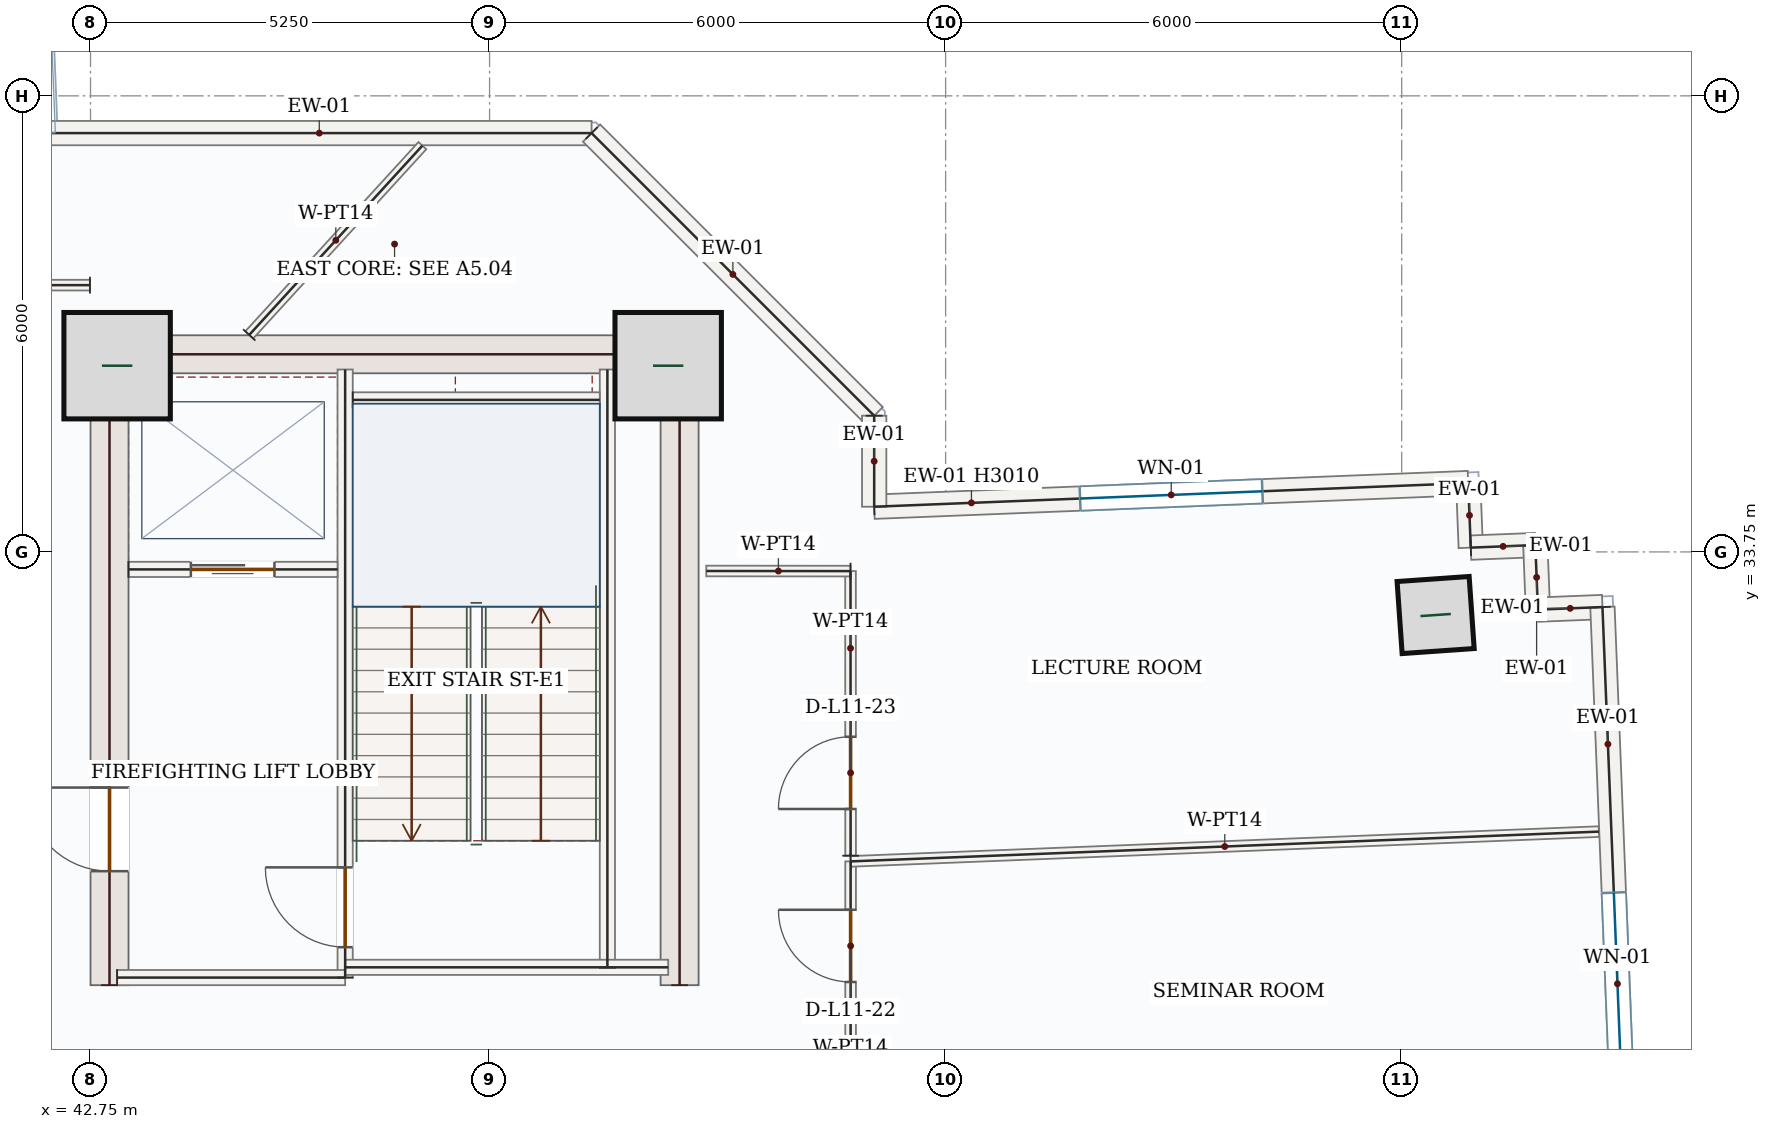
"""IFC4 building model, lengths in metres.
Left out: names, types, materials, properties, quantities, classifications, styles, units other than length and angle.
Written with IfcOpenShell. Run it as: python <this file> out.ifc"""

import sys

from ifc_helpers import new_model, si_unit, direction, frame, frame_2d, origin, origin_2d, place, context, subcontext, project, spatial, rectangle, hollow_rectangle, extrude, source, transform, mapped, element, fill, save


model = new_model("IFC4")
c1 = context("Model", 3, precision=1e-05, world=origin(), true_north=direction((0.0, 1.0)))
c2 = subcontext(c1, "Body", "Model", "MODEL_VIEW")
j1 = project(units=[si_unit("LENGTHUNIT", "METRE"), si_unit("PLANEANGLEUNIT", "RADIAN")], contexts=[c1])
p1 = place(None, origin())
s1 = spatial("IfcSite", under=j1, at=p1, CompositionType="ELEMENT")
p2 = place(p1, origin())
s2 = spatial("IfcBuilding", under=s1, at=p2, CompositionType="ELEMENT")
p3 = place(p2, frame((0.0, 0.0, 54.3)))
s3 = spatial("IfcBuildingStorey", under=s2, at=p3, CompositionType="ELEMENT", Elevation=54.3)
p4 = place(p3, frame((43.0, 28.05, 0.0), z_axis=(0.0, 0.0, 1.0), x_axis=(0.0, 1.0, 0.0)))
e1 = element("IfcWall", 1, at=p4, inside=s3, PredefinedType="SHEAR", context=c2, shape_type="SweptSolid", body=[
    extrude(rectangle(XDim=8.55, YDim=0.5, at=frame_2d((4.275, 0.0))), origin(), (0.0, 0.0, 1.0), 3.95),
])
p5 = place(p4, frame((1.5, 0.0, 0.0)))
e2 = element("IfcOpeningElement", 2, at=p5, cuts=e1, PredefinedType="OPENING", context=c2, shape_type="SweptSolid", body=[
    extrude(rectangle(XDim=1.1, YDim=2.2, at=frame_2d((0.55, 1.1))), frame((0.0, 0.26, 0.0), z_axis=(0.0, -1.0, 0.0), x_axis=(1.0, 0.0, 0.0)), (0.0, 0.0, 1.0), 0.52),
])
m1 = source(origin(), c2, "Body", "SweptSolid", [
    extrude(rectangle(XDim=8.55, YDim=0.5, at=frame_2d((4.275, 0.0))), origin(), (0.0, 0.0, 1.0), 3.95),
])
p6 = place(p3, frame((50.5, 28.05, 0.0), z_axis=(0.0, 0.0, 1.0), x_axis=(0.0, 1.0, 0.0)))
e3 = element("IfcWall", 3, at=p6, inside=s3, PredefinedType="SHEAR", context=c2, shape_type="MappedRepresentation", body=[
    mapped(m1, transform((0.0, 0.0, 0.0), x_axis=(1.0, 0.0, 0.0), y_axis=(0.0, 1.0, 0.0), z_axis=(0.0, 0.0, 1.0), scale=1.0)),
])
m2 = source(origin(), c2, "Body", "SweptSolid", [
    extrude(rectangle(XDim=7.0, YDim=0.5, at=frame_2d((3.5, 0.0))), origin(), (0.0, 0.0, 1.0), 3.95),
])
p7 = place(p3, frame((43.25, 36.35, 0.0), z_axis=(0.0, 0.0, 1.0), x_axis=(1.0, 0.0, 0.0)))
e4 = element("IfcWall", 4, at=p7, inside=s3, PredefinedType="SHEAR", context=c2, shape_type="MappedRepresentation", body=[
    mapped(m2, transform((0.0, 0.0, 0.0), x_axis=(1.0, 0.0, 0.0), y_axis=(0.0, 1.0, 0.0), z_axis=(0.0, 0.0, 1.0), scale=1.0)),
])
m3 = source(origin(), c2, "Body", "SweptSolid", [
    extrude(rectangle(XDim=1.4, YDim=1.4, at=origin_2d()), origin(), (0.0, 0.0, 1.0), 4.2),
])
for number, where, z_axis, x_axis in (
    (5, (43.1, 36.2, 0.0), (0.0, 0.0, 1.0), (1.0, 0.0, 0.0)),
    (6, (50.35, 36.2, 0.0), (0.0, 0.0, 1.0), (1.0, 0.0, 0.0)),
):
    element("IfcColumn", number, at=place(p3, frame(where, z_axis=z_axis, x_axis=x_axis)), inside=s3, PredefinedType="COLUMN", context=c2, shape_type="MappedRepresentation", body=[
        mapped(m3, transform((0.0, 0.0, 0.0), x_axis=(1.0, 0.0, 0.0), y_axis=(0.0, 1.0, 0.0), z_axis=(0.0, 0.0, 1.0), scale=1.0)),
    ])
m4 = source(origin(), c2, "Body", "SweptSolid", [
    extrude(hollow_rectangle(XDim=0.95, YDim=0.95, WallThickness=0.05, at=origin_2d()), origin(), (0.0, 0.0, 1.0), 4.2),
])
p8 = place(p3, frame((60.447, 32.92, 0.0), z_axis=(0.0, 0.0, 1.0), x_axis=(0.99756405026, 0.069756473744, 0.0)))
e7 = element("IfcColumn", 7, at=p8, inside=s3, PredefinedType="COLUMN", context=c2, shape_type="MappedRepresentation", body=[
    mapped(m4, transform((0.0, 0.0, 0.0), x_axis=(1.0, 0.0, 0.0), y_axis=(0.0, 1.0, 0.0), z_axis=(0.0, 0.0, 1.0), scale=1.0)),
])
p9 = place(p3, frame((53.06, 34.344, 0.0), z_axis=(0.0, 0.0, 1.0), x_axis=(0.999208917222, 0.039768577336, 0.0)))
e8 = element("IfcWall", 8, at=p9, inside=s3, PredefinedType="SOLIDWALL", context=c2, shape_type="SweptSolid", body=[
    extrude(rectangle(XDim=7.821, YDim=0.32, at=frame_2d((3.911, 0.0))), origin(), (0.0, 0.0, 1.0), 3.01),
])
p10 = place(p9, frame((2.711, 0.0, 0.85)))
e9 = element("IfcOpeningElement", 9, at=p10, cuts=e8, PredefinedType="OPENING", context=c2, shape_type="SweptSolid", body=[
    extrude(rectangle(XDim=2.4, YDim=1.8, at=frame_2d((1.2, 0.9))), frame((0.0, 0.17, 0.0), z_axis=(0.0, -1.0, 0.0), x_axis=(1.0, 0.0, 0.0)), (0.0, 0.0, 1.0), 0.34),
])
m5 = source(origin(), c2, "Body", "SweptSolid", [
    extrude(rectangle(XDim=0.85, YDim=0.32, at=frame_2d((0.425, 0.0))), origin(), (0.0, 0.0, 1.0), 3.95),
])
p11 = place(p3, frame((60.875, 34.656, 0.0), z_axis=(0.0, 0.0, 1.0), x_axis=(0.039933618331, -0.999202334929, 0.0)))
e10 = element("IfcWall", 10, at=p11, inside=s3, PredefinedType="SOLIDWALL", context=c2, shape_type="MappedRepresentation", body=[
    mapped(m5, transform((0.0, 0.0, 0.0), x_axis=(1.0, 0.0, 0.0), y_axis=(0.0, 1.0, 0.0), z_axis=(0.0, 0.0, 1.0), scale=1.0)),
])
m6 = source(origin(), c2, "Body", "SweptSolid", [
    extrude(rectangle(XDim=0.85, YDim=0.32, at=frame_2d((0.425, 0.0))), origin(), (0.0, 0.0, 1.0), 3.95),
])
for number, where, z_axis, x_axis in (
    (11, (60.909, 33.806, 0.0), (0.0, 0.0, 1.0), (0.999, 0.04, 0.0)),
    (12, (61.758, 33.84, 0.0), (0.0, 0.0, 1.0), (0.04, -0.999, 0.0)),
    (13, (61.792, 32.991, 0.0), (0.0, 0.0, 1.0), (0.999, 0.04, 0.0)),
):
    element("IfcWall", number, at=place(p3, frame(where, z_axis=z_axis, x_axis=x_axis)), inside=s3, PredefinedType="SOLIDWALL", context=c2, shape_type="MappedRepresentation", body=[
        mapped(m6, transform((0.0, 0.0, 0.0), x_axis=(1.0, 0.0, 0.0), y_axis=(0.0, 1.0, 0.0), z_axis=(0.0, 0.0, 1.0), scale=1.0)),
    ])
p12 = place(p3, frame((62.641, 33.025, 0.0), z_axis=(0.0, 0.0, 1.0), x_axis=(0.03977146366, -0.999208802342, 0.0)))
e14 = element("IfcWall", 14, at=p12, inside=s3, PredefinedType="SOLIDWALL", context=c2, shape_type="SweptSolid", body=[
    extrude(rectangle(XDim=9.92, YDim=0.32, at=frame_2d((4.96, 0.0))), origin(), (0.0, 0.0, 1.0), 3.95),
])
p13 = place(p12, frame((3.76, 0.0, 0.85)))
e15 = element("IfcOpeningElement", 15, at=p13, cuts=e14, PredefinedType="OPENING", context=c2, shape_type="SweptSolid", body=[
    extrude(rectangle(XDim=2.4, YDim=1.8, at=frame_2d((1.2, 0.9))), frame((0.0, 0.17, 0.0), z_axis=(0.0, -1.0, 0.0), x_axis=(1.0, 0.0, 0.0)), (0.0, 0.0, 1.0), 0.34),
])
m7 = source(origin(), c2, "Body", "SweptSolid", [
    extrude(rectangle(XDim=7.165, YDim=0.32, at=frame_2d((3.583, 0.0))), origin(), (0.0, 0.0, 1.0), 3.95),
])
p14 = place(p3, frame((42.177, 39.26, 0.0), z_axis=(0.0, 0.0, 1.0), x_axis=(1.0, 0.0, 0.0)))
e16 = element("IfcWall", 16, at=p14, inside=s3, PredefinedType="SOLIDWALL", context=c2, shape_type="MappedRepresentation", body=[
    mapped(m7, transform((0.0, 0.0, 0.0), x_axis=(1.0, 0.0, 0.0), y_axis=(0.0, 1.0, 0.0), z_axis=(0.0, 0.0, 1.0), scale=1.0)),
])
m8 = source(origin(), c2, "Body", "SweptSolid", [
    extrude(rectangle(XDim=5.258, YDim=0.32, at=frame_2d((2.629, 0.0))), origin(), (0.0, 0.0, 1.0), 3.95),
])
p15 = place(p3, frame((49.342, 39.26, 0.0), z_axis=(0.0, 0.0, 1.0), x_axis=(0.707106781187, -0.707106781187, 0.0)))
e17 = element("IfcWall", 17, at=p15, inside=s3, PredefinedType="SOLIDWALL", context=c2, shape_type="MappedRepresentation", body=[
    mapped(m8, transform((0.0, 0.0, 0.0), x_axis=(1.0, 0.0, 0.0), y_axis=(0.0, 1.0, 0.0), z_axis=(0.0, 0.0, 1.0), scale=1.0)),
])
m9 = source(origin(), c2, "Body", "SweptSolid", [
    extrude(rectangle(XDim=1.198, YDim=0.32, at=frame_2d((0.599, 0.0))), origin(), (0.0, 0.0, 1.0), 3.95),
])
p16 = place(p3, frame((53.06, 35.542, 0.0), z_axis=(0.0, 0.0, 1.0), x_axis=(0.0, -1.0, 0.0)))
e18 = element("IfcWall", 18, at=p16, inside=s3, PredefinedType="SOLIDWALL", context=c2, shape_type="MappedRepresentation", body=[
    mapped(m9, transform((0.0, 0.0, 0.0), x_axis=(1.0, 0.0, 0.0), y_axis=(0.0, 1.0, 0.0), z_axis=(0.0, 0.0, 1.0), scale=1.0)),
])
m10 = source(origin(), c2, "Body", "SweptSolid", [
    extrude(rectangle(XDim=7.87, YDim=0.2, at=frame_2d((3.935, 0.0))), origin(), (0.0, 0.0, 1.0), 3.95),
])
p17 = place(p3, frame((49.55, 28.28, 0.0), z_axis=(0.0, 0.0, 1.0), x_axis=(0.0, 1.0, 0.0)))
e19 = element("IfcWall", 19, at=p17, inside=s3, PredefinedType="SOLIDWALL", context=c2, shape_type="MappedRepresentation", body=[
    mapped(m10, transform((0.0, 0.0, 0.0), x_axis=(1.0, 0.0, 0.0), y_axis=(0.0, 1.0, 0.0), z_axis=(0.0, 0.0, 1.0), scale=1.0)),
])
p18 = place(p3, frame((46.1, 28.15, 0.0), z_axis=(0.0, 0.0, 1.0), x_axis=(0.0, 1.0, 0.0)))
e20 = element("IfcWall", 20, at=p18, inside=s3, PredefinedType="SOLIDWALL", context=c2, shape_type="SweptSolid", body=[
    extrude(rectangle(XDim=8.0, YDim=0.2, at=frame_2d((4.0, 0.0))), origin(), (0.0, 0.0, 1.0), 3.95),
])
p19 = place(p18, frame((0.4, 0.0, 0.0)))
e21 = element("IfcOpeningElement", 21, at=p19, cuts=e20, PredefinedType="OPENING", context=c2, shape_type="SweptSolid", body=[
    extrude(rectangle(XDim=1.05, YDim=2.15, at=frame_2d((0.525, 1.075))), frame((0.0, 0.11, 0.0), z_axis=(0.0, -1.0, 0.0), x_axis=(1.0, 0.0, 0.0)), (0.0, 0.0, 1.0), 0.22),
])
m11 = source(origin(), c2, "Body", "SweptSolid", [
    extrude(rectangle(XDim=3.0, YDim=0.2, at=frame_2d((1.5, 0.0))), origin(), (0.0, 0.0, 1.0), 3.95),
])
p20 = place(p3, frame((43.1, 28.15, 0.0), z_axis=(0.0, 0.0, 1.0), x_axis=(1.0, 0.0, 0.0)))
e22 = element("IfcWall", 22, at=p20, inside=s3, PredefinedType="SOLIDWALL", context=c2, shape_type="MappedRepresentation", body=[
    mapped(m11, transform((0.0, 0.0, 0.0), x_axis=(1.0, 0.0, 0.0), y_axis=(0.0, 1.0, 0.0), z_axis=(0.0, 0.0, 1.0), scale=1.0)),
])
m12 = source(origin(), c2, "Body", "SweptSolid", [
    extrude(rectangle(XDim=4.25, YDim=0.2, at=frame_2d((2.125, 0.0))), origin(), (0.0, 0.0, 1.0), 3.95),
])
p21 = place(p3, frame((46.1, 28.285, 0.0), z_axis=(0.0, 0.0, 1.0), x_axis=(1.0, 0.0, 0.0)))
e23 = element("IfcWall", 23, at=p21, inside=s3, PredefinedType="SOLIDWALL", context=c2, shape_type="MappedRepresentation", body=[
    mapped(m12, transform((0.0, 0.0, 0.0), x_axis=(1.0, 0.0, 0.0), y_axis=(0.0, 1.0, 0.0), z_axis=(0.0, 0.0, 1.0), scale=1.0)),
])
m13 = source(origin(), c2, "Body", "SweptSolid", [
    extrude(rectangle(XDim=3.25, YDim=0.2, at=frame_2d((1.625, 0.0))), origin(), (0.0, 0.0, 1.0), 3.95),
])
p22 = place(p3, frame((46.2, 35.75, 0.0), z_axis=(0.0, 0.0, 1.0), x_axis=(1.0, 0.0, 0.0)))
e24 = element("IfcWall", 24, at=p22, inside=s3, PredefinedType="SOLIDWALL", context=c2, shape_type="MappedRepresentation", body=[
    mapped(m13, transform((0.0, 0.0, 0.0), x_axis=(1.0, 0.0, 0.0), y_axis=(0.0, 1.0, 0.0), z_axis=(0.0, 0.0, 1.0), scale=1.0)),
])
p23 = place(p3, frame((43.25, 33.52, 0.0), z_axis=(0.0, 0.0, 1.0), x_axis=(1.0, 0.0, 0.0)))
e25 = element("IfcWall", 25, at=p23, inside=s3, PredefinedType="SOLIDWALL", context=c2, shape_type="SweptSolid", body=[
    extrude(rectangle(XDim=2.75, YDim=0.2, at=frame_2d((1.375, 0.0))), origin(), (0.0, 0.0, 1.0), 3.95),
])
p24 = place(p23, frame((0.82, 0.0, 0.0)))
e26 = element("IfcOpeningElement", 26, at=p24, cuts=e25, PredefinedType="OPENING", context=c2, shape_type="SweptSolid", body=[
    extrude(rectangle(XDim=1.1, YDim=2.15, at=frame_2d((0.55, 1.075))), frame((0.0, 0.11, 0.0), z_axis=(0.0, -1.0, 0.0), x_axis=(1.0, 0.0, 0.0)), (0.0, 0.0, 1.0), 0.22),
])
p25 = place(p3, frame((52.75, 25.835, 0.0), z_axis=(0.0, 0.0, 1.0), x_axis=(0.0, 1.0, 0.0)))
e27 = element("IfcWall", 27, at=p25, inside=s3, PredefinedType="PARTITIONING", context=c2, shape_type="SweptSolid", body=[
    extrude(rectangle(XDim=3.843, YDim=0.14, at=frame_2d((1.921, 0.0))), origin(), (0.0, 0.0, 1.0), 3.95),
])
p26 = place(p25, frame((2.257, 0.0, 0.0)))
e28 = element("IfcOpeningElement", 28, at=p26, cuts=e27, PredefinedType="OPENING", context=c2, shape_type="SweptSolid", body=[
    extrude(rectangle(XDim=0.95, YDim=2.15, at=frame_2d((0.475, 1.075))), frame((0.0, 0.08, 0.0), z_axis=(0.0, -1.0, 0.0), x_axis=(1.0, 0.0, 0.0)), (0.0, 0.0, 1.0), 0.16),
])
m14 = source(origin(), c2, "Body", "SweptSolid", [
    extrude(rectangle(XDim=9.851, YDim=0.14, at=frame_2d((4.925, 0.0))), origin(), (0.0, 0.0, 1.0), 3.95),
])
p27 = place(p3, frame((52.751, 29.678, 0.0), z_axis=(0.0, 0.0, 1.0), x_axis=(0.999208542072, 0.039778002084, 0.0)))
e29 = element("IfcWall", 29, at=p27, inside=s3, PredefinedType="PARTITIONING", context=c2, shape_type="MappedRepresentation", body=[
    mapped(m14, transform((0.0, 0.0, 0.0), x_axis=(1.0, 0.0, 0.0), y_axis=(0.0, 1.0, 0.0), z_axis=(0.0, 0.0, 1.0), scale=1.0)),
])
m15 = source(origin(), c2, "Body", "SweptSolid", [
    extrude(rectangle(XDim=3.375, YDim=0.14, at=frame_2d((1.688, 0.0))), origin(), (0.0, 0.0, 1.0), 3.95),
])
p28 = place(p3, frame((44.838, 36.605, 0.0), z_axis=(0.0, 0.0, 1.0), x_axis=(0.674974079893, 0.737841440604, 0.0)))
e30 = element("IfcWall", 30, at=p28, inside=s3, PredefinedType="PARTITIONING", context=c2, shape_type="MappedRepresentation", body=[
    mapped(m15, transform((0.0, 0.0, 0.0), x_axis=(1.0, 0.0, 0.0), y_axis=(0.0, 1.0, 0.0), z_axis=(0.0, 0.0, 1.0), scale=1.0)),
])
p29 = place(p3, frame((52.75, 29.753, 0.0), z_axis=(0.0, 0.0, 1.0), x_axis=(-0.000326030238, 0.999999946852, 0.0)))
e31 = element("IfcWall", 31, at=p29, inside=s3, PredefinedType="PARTITIONING", context=c2, shape_type="SweptSolid", body=[
    extrude(rectangle(XDim=3.744, YDim=0.14, at=frame_2d((1.872, 0.0))), origin(), (0.0, 0.0, 1.0), 3.95),
])
p30 = place(p29, frame((0.615, 0.0, 0.0)))
e32 = element("IfcOpeningElement", 32, at=p30, cuts=e31, PredefinedType="OPENING", context=c2, shape_type="SweptSolid", body=[
    extrude(rectangle(XDim=0.95, YDim=2.15, at=frame_2d((0.475, 1.075))), frame((0.0, 0.08, 0.0), z_axis=(0.0, -1.0, 0.0), x_axis=(1.0, 0.0, 0.0)), (0.0, 0.0, 1.0), 0.16),
])
m16 = source(origin(), c2, "Body", "SweptSolid", [
    extrude(rectangle(XDim=1.898, YDim=0.14, at=frame_2d((0.949, 0.0))), origin(), (0.0, 0.0, 1.0), 3.95),
])
p31 = place(p3, frame((52.749, 33.498, 0.0), z_axis=(0.0, 0.0, 1.0), x_axis=(-0.999999702083, 0.00077190251, 0.0)))
e33 = element("IfcWall", 33, at=p31, inside=s3, PredefinedType="PARTITIONING", context=c2, shape_type="MappedRepresentation", body=[
    mapped(m16, transform((0.0, 0.0, 0.0), x_axis=(1.0, 0.0, 0.0), y_axis=(0.0, 1.0, 0.0), z_axis=(0.0, 0.0, 1.0), scale=1.0)),
])
p32 = place(p3, frame((42.742, 37.26, 0.0), z_axis=(0.0, 0.0, 1.0), x_axis=(-0.999999998277, 5.8706117e-05, 0.0)))
e34 = element("IfcWall", 34, at=p32, inside=s3, PredefinedType="PARTITIONING", context=c2, shape_type="SweptSolid", body=[
    extrude(rectangle(XDim=4.159, YDim=0.14, at=frame_2d((2.079, 0.0))), origin(), (0.0, 0.0, 1.0), 3.95),
])
p33 = place(p32, frame((2.503, 0.0, 0.0)))
e35 = element("IfcOpeningElement", 35, at=p33, cuts=e34, PredefinedType="OPENING", context=c2, shape_type="SweptSolid", body=[
    extrude(rectangle(XDim=0.95, YDim=2.15, at=frame_2d((0.475, 1.075))), frame((0.0, 0.08, 0.0), z_axis=(0.0, -1.0, 0.0), x_axis=(1.0, 0.0, 0.0)), (0.0, 0.0, 1.0), 0.16),
])
m17 = source(origin(), c2, "Body", "SweptSolid", [
    extrude(rectangle(XDim=2.4, YDim=1.8, at=frame_2d((1.2, 0.9))), frame((0.0, 0.03, 0.0), z_axis=(0.0, -1.0, 0.0), x_axis=(1.0, 0.0, 0.0)), (0.0, 0.0, 1.0), 0.06),
])
p34 = place(p10, origin())
e36 = element("IfcWindow", 36, at=p34, inside=s3, PartitioningType="DOUBLE_PANEL_VERTICAL", PredefinedType="WINDOW", context=c2, shape_type="MappedRepresentation", body=[
    mapped(m17, transform((0.0, 0.0, 0.0), x_axis=(1.0, 0.0, 0.0), y_axis=(0.0, 1.0, 0.0), z_axis=(0.0, 0.0, 1.0), scale=1.0)),
])
fill(e9, e36)
p35 = place(p13, origin())
e37 = element("IfcWindow", 37, at=p35, inside=s3, PartitioningType="DOUBLE_PANEL_VERTICAL", PredefinedType="WINDOW", context=c2, shape_type="MappedRepresentation", body=[
    mapped(m17, transform((0.0, 0.0, 0.0), x_axis=(1.0, 0.0, 0.0), y_axis=(0.0, 1.0, 0.0), z_axis=(0.0, 0.0, 1.0), scale=1.0)),
])
fill(e15, e37)
m18 = source(origin(), c2, "Body", "SweptSolid", [
    extrude(rectangle(XDim=1.05, YDim=2.15, at=frame_2d((0.525, 1.075))), frame((0.0, 0.025, 0.0), z_axis=(0.0, -1.0, 0.0), x_axis=(1.0, 0.0, 0.0)), (0.0, 0.0, 1.0), 0.05),
])
p36 = place(p19, origin())
e38 = element("IfcDoor", 38, at=p36, inside=s3, OperationType="SINGLE_SWING_RIGHT", PredefinedType="DOOR", context=c2, shape_type="MappedRepresentation", body=[
    mapped(m18, transform((0.0, 0.0, 0.0), x_axis=(1.0, 0.0, 0.0), y_axis=(0.0, 1.0, 0.0), z_axis=(0.0, 0.0, 1.0), scale=1.0)),
])
fill(e21, e38)
m19 = source(origin(), c2, "Body", "SweptSolid", [
    extrude(rectangle(XDim=1.1, YDim=2.15, at=frame_2d((0.55, 1.075))), frame((0.0, 0.025, 0.0), z_axis=(0.0, -1.0, 0.0), x_axis=(1.0, 0.0, 0.0)), (0.0, 0.0, 1.0), 0.05),
])
p37 = place(p24, origin())
e39 = element("IfcDoor", 39, at=p37, inside=s3, OperationType="DOUBLE_DOOR_SLIDING", PredefinedType="DOOR", context=c2, shape_type="MappedRepresentation", body=[
    mapped(m19, transform((0.0, 0.0, 0.0), x_axis=(1.0, 0.0, 0.0), y_axis=(0.0, 1.0, 0.0), z_axis=(0.0, 0.0, 1.0), scale=1.0)),
])
fill(e26, e39)
m20 = source(origin(), c2, "Body", "SweptSolid", [
    extrude(rectangle(XDim=1.1, YDim=2.2, at=frame_2d((0.55, 1.1))), frame((0.0, 0.025, 0.0), z_axis=(0.0, -1.0, 0.0), x_axis=(1.0, 0.0, 0.0)), (0.0, 0.0, 1.0), 0.05),
])
p38 = place(p5, origin())
e40 = element("IfcDoor", 40, at=p38, inside=s3, OperationType="SINGLE_SWING_RIGHT", PredefinedType="DOOR", context=c2, shape_type="MappedRepresentation", body=[
    mapped(m20, transform((0.0, 0.0, 0.0), x_axis=(1.0, 0.0, 0.0), y_axis=(0.0, 1.0, 0.0), z_axis=(0.0, 0.0, 1.0), scale=1.0)),
])
fill(e2, e40)
m21 = source(origin(), c2, "Body", "SweptSolid", [
    extrude(rectangle(XDim=0.95, YDim=2.15, at=frame_2d((0.475, 1.075))), frame((0.0, 0.025, 0.0), z_axis=(0.0, -1.0, 0.0), x_axis=(1.0, 0.0, 0.0)), (0.0, 0.0, 1.0), 0.05),
])
p39 = place(p26, origin())
e41 = element("IfcDoor", 41, at=p39, inside=s3, OperationType="SINGLE_SWING_RIGHT", PredefinedType="DOOR", context=c2, shape_type="MappedRepresentation", body=[
    mapped(m21, transform((0.0, 0.0, 0.0), x_axis=(1.0, 0.0, 0.0), y_axis=(0.0, 1.0, 0.0), z_axis=(0.0, 0.0, 1.0), scale=1.0)),
])
fill(e28, e41)
p40 = place(p30, origin())
e42 = element("IfcDoor", 42, at=p40, inside=s3, OperationType="SINGLE_SWING_LEFT", PredefinedType="DOOR", context=c2, shape_type="MappedRepresentation", body=[
    mapped(m21, transform((0.0, 0.0, 0.0), x_axis=(1.0, 0.0, 0.0), y_axis=(0.0, 1.0, 0.0), z_axis=(0.0, 0.0, 1.0), scale=1.0)),
])
fill(e32, e42)
save(model, sys.argv[1])
